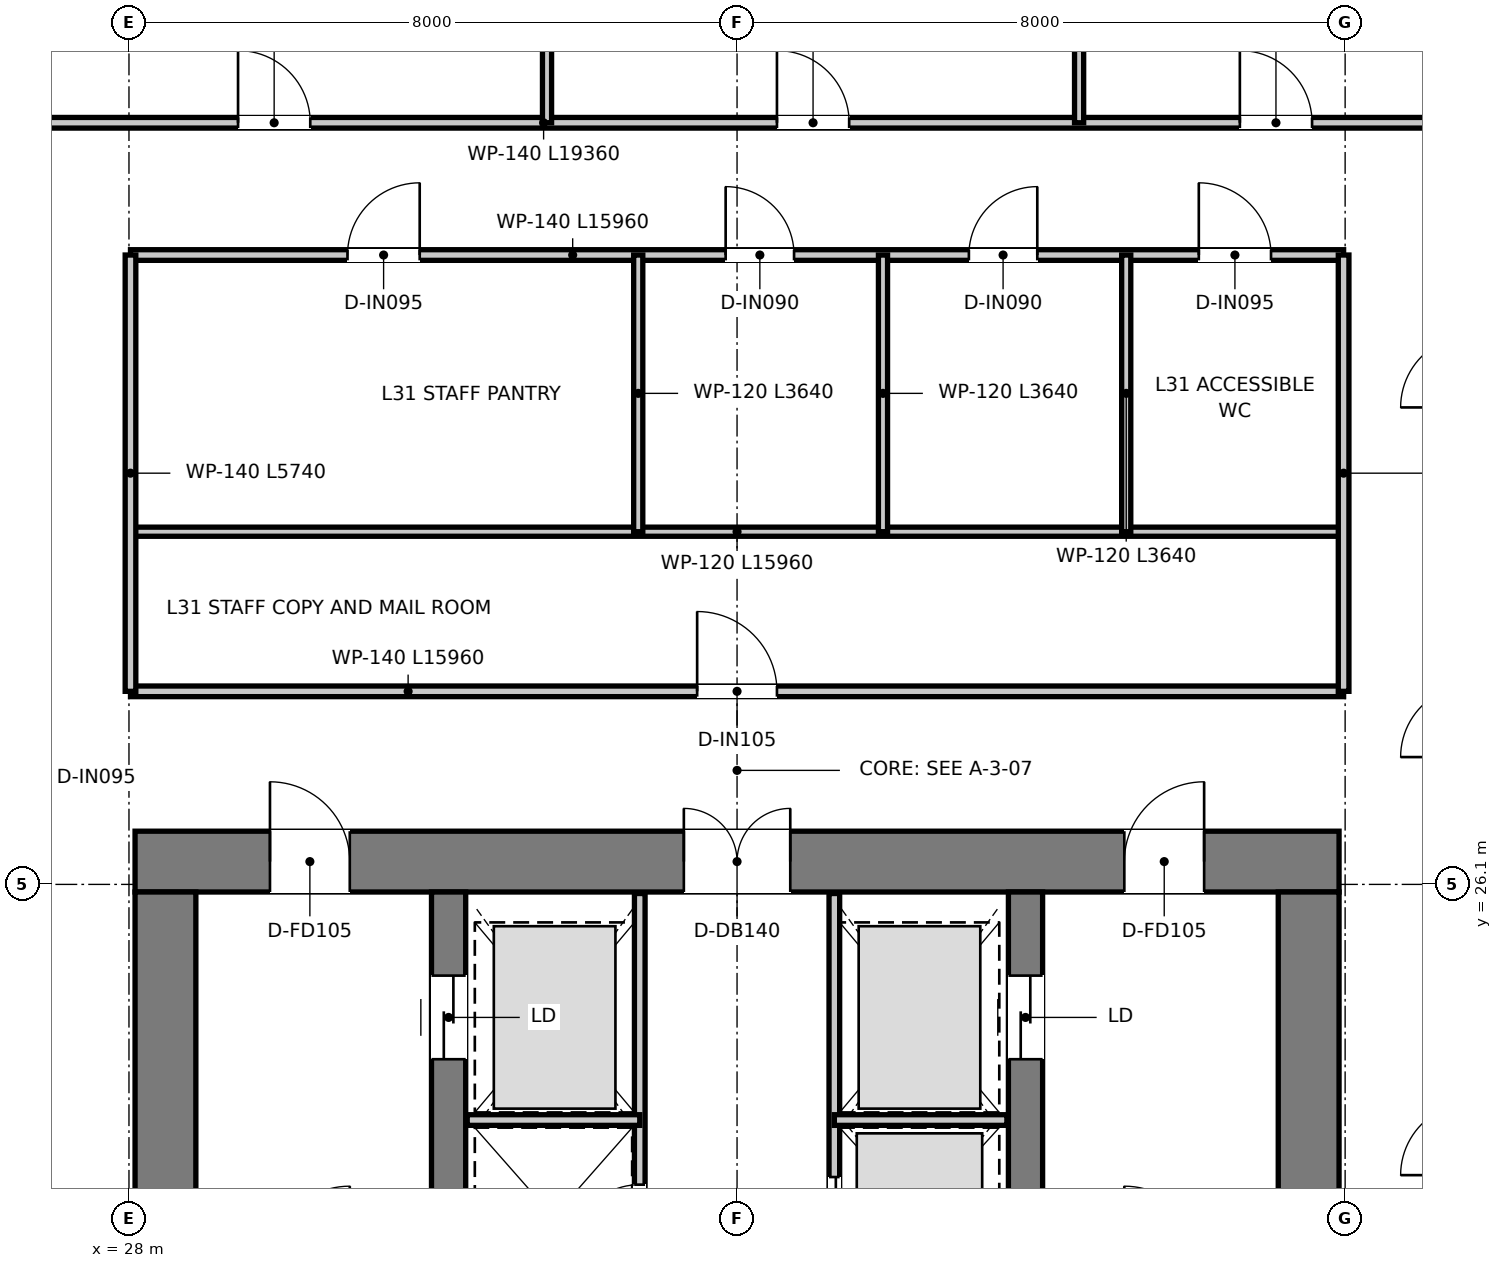
"""IFC4 building model, lengths in metres.
Left out: names, types, materials, properties, quantities, classifications, styles, units other than length and angle.
Written with IfcOpenShell. Run it as: python <this file> out.ifc"""

import sys

from ifc_helpers import new_model, si_unit, direction, frame, frame_2d, origin, place, context, subcontext, project, spatial, rectangle, extrude, element, fill, save


model = new_model("IFC4")
c1 = context("Model", 3, precision=1e-05, world=origin(), true_north=direction((0.0, 1.0)))
c2 = subcontext(c1, "Body", "Model", "MODEL_VIEW")
j1 = project(units=[si_unit("LENGTHUNIT", "METRE"), si_unit("PLANEANGLEUNIT", "RADIAN")], contexts=[c1])
p1 = place(None, origin())
s1 = spatial("IfcSite", under=j1, at=p1, CompositionType="ELEMENT")
p2 = place(p1, origin())
s2 = spatial("IfcBuilding", under=s1, at=p2, CompositionType="ELEMENT")
p3 = place(p2, frame((0.0, 0.0, 129.55)))
s3 = spatial("IfcBuildingStorey", under=s2, at=p3, CompositionType="ELEMENT", Elevation=129.55)
p4 = place(p3, frame((28.08, 26.4, 0.0), z_axis=(0.0, 0.0, 1.0), x_axis=(1.0, 0.0, 0.0)))
e1 = element("IfcWall", 1, at=p4, inside=s3, PredefinedType="SHEAR", context=c2, shape_type="SweptSolid", body=[
    extrude(rectangle(XDim=15.84, YDim=0.8, at=frame_2d((7.92, 0.0))), origin(), (0.0, 0.0, 1.0), 3.95),
])
p5 = place(p4, frame((7.22, 0.0, 0.0)))
e2 = element("IfcOpeningElement", 2, at=p5, cuts=e1, PredefinedType="OPENING", context=c2, shape_type="SweptSolid", body=[
    extrude(rectangle(XDim=1.4, YDim=2.2, at=frame_2d((0.7, 1.1))), frame((0.0, 0.41, 0.0), z_axis=(0.0, -1.0, 0.0), x_axis=(1.0, 0.0, 0.0)), (0.0, 0.0, 1.0), 0.82),
])
p6 = place(p4, frame((1.775, 0.0, 0.0)))
e3 = element("IfcOpeningElement", 3, at=p6, cuts=e1, PredefinedType="OPENING", context=c2, shape_type="SweptSolid", body=[
    extrude(rectangle(XDim=1.05, YDim=2.1, at=frame_2d((0.525, 1.05))), frame((0.0, 0.41, 0.0), z_axis=(0.0, -1.0, 0.0), x_axis=(1.0, 0.0, 0.0)), (0.0, 0.0, 1.0), 0.82),
])
p7 = place(p4, frame((13.015, 0.0, 0.0)))
e4 = element("IfcOpeningElement", 4, at=p7, cuts=e1, PredefinedType="OPENING", context=c2, shape_type="SweptSolid", body=[
    extrude(rectangle(XDim=1.05, YDim=2.1, at=frame_2d((0.525, 1.05))), frame((0.0, 0.41, 0.0), z_axis=(0.0, -1.0, 0.0), x_axis=(1.0, 0.0, 0.0)), (0.0, 0.0, 1.0), 0.82),
])
for number, where, z_axis, x_axis in (
    (5, (28.48, 11.3, 0.0), (0.0, 0.0, 1.0), (0.0, 1.0, 0.0)),
    (6, (43.52, 11.3, 0.0), (0.0, 0.0, 1.0), (0.0, 1.0, 0.0)),
):
    element("IfcWall", number, at=place(p3, frame(where, z_axis=z_axis, x_axis=x_axis)), inside=s3, PredefinedType="SHEAR", context=c2, shape_type="SweptSolid", body=[
        extrude(rectangle(XDim=14.7, YDim=0.8, at=frame_2d((7.35, 0.0))), origin(), (0.0, 0.0, 1.0), 3.95),
    ])
p8 = place(p3, frame((32.205, 13.22, 0.0), z_axis=(0.0, 0.0, 1.0), x_axis=(0.0, 1.0, 0.0)))
e7 = element("IfcWall", 7, at=p8, inside=s3, PredefinedType="SHEAR", context=c2, shape_type="SweptSolid", body=[
    extrude(rectangle(XDim=12.78, YDim=0.45, at=frame_2d((6.39, 0.0))), origin(), (0.0, 0.0, 1.0), 3.95),
])
p9 = place(p8, frame((10.58, 0.0, 0.0)))
e8 = element("IfcOpeningElement", 8, at=p9, cuts=e7, PredefinedType="OPENING", context=c2, shape_type="SweptSolid", body=[
    extrude(rectangle(XDim=1.1, YDim=2.15, at=frame_2d((0.55, 1.075))), frame((0.0, 0.235, 0.0), z_axis=(0.0, -1.0, 0.0), x_axis=(1.0, 0.0, 0.0)), (0.0, 0.0, 1.0), 0.47),
])
p10 = place(p3, frame((39.795, 13.22, 0.0), z_axis=(0.0, 0.0, 1.0), x_axis=(0.0, 1.0, 0.0)))
e9 = element("IfcWall", 9, at=p10, inside=s3, PredefinedType="SHEAR", context=c2, shape_type="SweptSolid", body=[
    extrude(rectangle(XDim=12.78, YDim=0.45, at=frame_2d((6.39, 0.0))), origin(), (0.0, 0.0, 1.0), 3.95),
])
p11 = place(p10, frame((10.58, 0.0, 0.0)))
e10 = element("IfcOpeningElement", 10, at=p11, cuts=e9, PredefinedType="OPENING", context=c2, shape_type="SweptSolid", body=[
    extrude(rectangle(XDim=1.1, YDim=2.15, at=frame_2d((0.55, 1.075))), frame((0.0, 0.235, 0.0), z_axis=(0.0, -1.0, 0.0), x_axis=(1.0, 0.0, 0.0)), (0.0, 0.0, 1.0), 0.47),
])
p12 = place(p3, frame((34.72, 20.2, 0.0), z_axis=(0.0, 0.0, 1.0), x_axis=(0.0, 1.0, 0.0)))
e11 = element("IfcWall", 11, at=p12, inside=s3, PredefinedType="PARTITIONING", context=c2, shape_type="SweptSolid", body=[
    extrude(rectangle(XDim=5.78, YDim=0.14, at=frame_2d((2.89, 0.0))), origin(), (0.0, 0.0, 1.0), 2.67),
])
p13 = place(p12, frame((1.05, 0.0, 0.0)))
e12 = element("IfcOpeningElement", 12, at=p13, cuts=e11, PredefinedType="OPENING", context=c2, shape_type="SweptSolid", body=[
    extrude(rectangle(XDim=0.9, YDim=2.1, at=frame_2d((0.45, 1.05))), frame((0.0, 0.08, 0.0), z_axis=(0.0, -1.0, 0.0), x_axis=(1.0, 0.0, 0.0)), (0.0, 0.0, 1.0), 0.16),
])
p14 = place(p3, frame((37.28, 20.2, 0.0), z_axis=(0.0, 0.0, 1.0), x_axis=(0.0, 1.0, 0.0)))
e13 = element("IfcWall", 13, at=p14, inside=s3, PredefinedType="PARTITIONING", context=c2, shape_type="SweptSolid", body=[
    extrude(rectangle(XDim=5.78, YDim=0.14, at=frame_2d((2.89, 0.0))), origin(), (0.0, 0.0, 1.0), 2.67),
])
p15 = place(p14, frame((0.95, 0.0, 0.0)))
e14 = element("IfcOpeningElement", 14, at=p15, cuts=e13, PredefinedType="OPENING", context=c2, shape_type="SweptSolid", body=[
    extrude(rectangle(XDim=1.1, YDim=2.15, at=frame_2d((0.55, 1.075))), frame((0.0, 0.08, 0.0), z_axis=(0.0, -1.0, 0.0), x_axis=(1.0, 0.0, 0.0)), (0.0, 0.0, 1.0), 0.16),
])
for number, where, z_axis, x_axis in (
    (15, (32.45, 23.0, 0.0), (0.0, 0.0, 1.0), (1.0, 0.0, 0.0)),
    (16, (37.28, 23.0, 0.0), (0.0, 0.0, 1.0), (1.0, 0.0, 0.0)),
):
    element("IfcWall", number, at=place(p3, frame(where, z_axis=z_axis, x_axis=x_axis)), inside=s3, PredefinedType="PARTITIONING", context=c2, shape_type="SweptSolid", body=[
        extrude(rectangle(XDim=2.27, YDim=0.14, at=frame_2d((1.135, 0.0))), origin(), (0.0, 0.0, 1.0), 2.67),
    ])
p16 = place(p3, frame((28.02, 28.64, 0.0), z_axis=(0.0, 0.0, 1.0), x_axis=(1.0, 0.0, 0.0)))
e17 = element("IfcWall", 17, at=p16, inside=s3, PredefinedType="PARTITIONING", context=c2, shape_type="SweptSolid", body=[
    extrude(rectangle(XDim=15.96, YDim=0.14, at=frame_2d((7.98, 0.0))), origin(), (0.0, 0.0, 1.0), 3.08),
])
p17 = place(p16, frame((7.455, 0.0, 0.0)))
e18 = element("IfcOpeningElement", 18, at=p17, cuts=e17, PredefinedType="OPENING", context=c2, shape_type="SweptSolid", body=[
    extrude(rectangle(XDim=1.05, YDim=2.15, at=frame_2d((0.525, 1.075))), frame((0.0, 0.08, 0.0), z_axis=(0.0, -1.0, 0.0), x_axis=(1.0, 0.0, 0.0)), (0.0, 0.0, 1.0), 0.16),
])
p18 = place(p3, frame((28.02, 30.74, 0.0), z_axis=(0.0, 0.0, 1.0), x_axis=(1.0, 0.0, 0.0)))
e19 = element("IfcWall", 19, at=p18, inside=s3, PredefinedType="PARTITIONING", context=c2, shape_type="SweptSolid", body=[
    extrude(rectangle(XDim=15.96, YDim=0.12, at=frame_2d((7.98, 0.0))), origin(), (0.0, 0.0, 1.0), 3.08),
])
p19 = place(p3, frame((28.02, 34.38, 0.0), z_axis=(0.0, 0.0, 1.0), x_axis=(1.0, 0.0, 0.0)))
e20 = element("IfcWall", 20, at=p19, inside=s3, PredefinedType="PARTITIONING", context=c2, shape_type="SweptSolid", body=[
    extrude(rectangle(XDim=15.96, YDim=0.14, at=frame_2d((7.98, 0.0))), origin(), (0.0, 0.0, 1.0), 3.08),
])
p20 = place(p19, frame((7.83, 0.0, 0.0)))
e21 = element("IfcOpeningElement", 21, at=p20, cuts=e20, PredefinedType="OPENING", context=c2, shape_type="SweptSolid", body=[
    extrude(rectangle(XDim=0.9, YDim=2.1, at=frame_2d((0.45, 1.05))), frame((0.0, 0.08, 0.0), z_axis=(0.0, -1.0, 0.0), x_axis=(1.0, 0.0, 0.0)), (0.0, 0.0, 1.0), 0.16),
])
p21 = place(p19, frame((11.03, 0.0, 0.0)))
e22 = element("IfcOpeningElement", 22, at=p21, cuts=e20, PredefinedType="OPENING", context=c2, shape_type="SweptSolid", body=[
    extrude(rectangle(XDim=0.9, YDim=2.1, at=frame_2d((0.45, 1.05))), frame((0.0, 0.08, 0.0), z_axis=(0.0, -1.0, 0.0), x_axis=(1.0, 0.0, 0.0)), (0.0, 0.0, 1.0), 0.16),
])
p22 = place(p19, frame((14.055, 0.0, 0.0)))
e23 = element("IfcOpeningElement", 23, at=p22, cuts=e20, PredefinedType="OPENING", context=c2, shape_type="SweptSolid", body=[
    extrude(rectangle(XDim=0.95, YDim=2.1, at=frame_2d((0.475, 1.05))), frame((0.0, 0.08, 0.0), z_axis=(0.0, -1.0, 0.0), x_axis=(1.0, 0.0, 0.0)), (0.0, 0.0, 1.0), 0.16),
])
p23 = place(p19, frame((2.855, 0.0, 0.0)))
e24 = element("IfcOpeningElement", 24, at=p23, cuts=e20, PredefinedType="OPENING", context=c2, shape_type="SweptSolid", body=[
    extrude(rectangle(XDim=0.95, YDim=2.1, at=frame_2d((0.475, 1.05))), frame((0.0, 0.08, 0.0), z_axis=(0.0, -1.0, 0.0), x_axis=(1.0, 0.0, 0.0)), (0.0, 0.0, 1.0), 0.16),
])
for number, where, z_axis, x_axis in (
    (25, (28.02, 28.64, 0.0), (0.0, 0.0, 1.0), (0.0, 1.0, 0.0)),
    (26, (43.98, 28.64, 0.0), (0.0, 0.0, 1.0), (0.0, 1.0, 0.0)),
):
    element("IfcWall", number, at=place(p3, frame(where, z_axis=z_axis, x_axis=x_axis)), inside=s3, PredefinedType="PARTITIONING", context=c2, shape_type="SweptSolid", body=[
        extrude(rectangle(XDim=5.74, YDim=0.14, at=frame_2d((2.87, 0.0))), origin(), (0.0, 0.0, 1.0), 3.27),
    ])
for number, where, z_axis, x_axis in (
    (27, (37.92, 30.74, 0.0), (0.0, 0.0, 1.0), (0.0, 1.0, 0.0)),
    (28, (41.12, 30.74, 0.0), (0.0, 0.0, 1.0), (0.0, 1.0, 0.0)),
    (29, (34.7, 30.74, 0.0), (0.0, 0.0, 1.0), (0.0, 1.0, 0.0)),
):
    element("IfcWall", number, at=place(p3, frame(where, z_axis=z_axis, x_axis=x_axis)), inside=s3, PredefinedType="PARTITIONING", context=c2, shape_type="SweptSolid", body=[
        extrude(rectangle(XDim=3.64, YDim=0.12, at=frame_2d((1.82, 0.0))), origin(), (0.0, 0.0, 1.0), 3.17),
    ])
p24 = place(p3, frame((26.32, 36.12, 0.0), z_axis=(0.0, 0.0, 1.0), x_axis=(1.0, 0.0, 0.0)))
e30 = element("IfcWall", 30, at=p24, inside=s3, PredefinedType="PARTITIONING", context=c2, shape_type="SweptSolid", body=[
    extrude(rectangle(XDim=19.36, YDim=0.14, at=frame_2d((9.68, 0.0))), origin(), (0.0, 0.0, 1.0), 3.08),
])
p25 = place(p24, frame((3.115, 0.0, 0.0)))
e31 = element("IfcOpeningElement", 31, at=p25, cuts=e30, PredefinedType="OPENING", context=c2, shape_type="SweptSolid", body=[
    extrude(rectangle(XDim=0.95, YDim=2.1, at=frame_2d((0.475, 1.05))), frame((0.0, 0.08, 0.0), z_axis=(0.0, -1.0, 0.0), x_axis=(1.0, 0.0, 0.0)), (0.0, 0.0, 1.0), 0.16),
])
p26 = place(p24, frame((10.205, 0.0, 0.0)))
e32 = element("IfcOpeningElement", 32, at=p26, cuts=e30, PredefinedType="OPENING", context=c2, shape_type="SweptSolid", body=[
    extrude(rectangle(XDim=0.95, YDim=2.1, at=frame_2d((0.475, 1.05))), frame((0.0, 0.08, 0.0), z_axis=(0.0, -1.0, 0.0), x_axis=(1.0, 0.0, 0.0)), (0.0, 0.0, 1.0), 0.16),
])
p27 = place(p24, frame((16.295, 0.0, 0.0)))
e33 = element("IfcOpeningElement", 33, at=p27, cuts=e30, PredefinedType="OPENING", context=c2, shape_type="SweptSolid", body=[
    extrude(rectangle(XDim=0.95, YDim=2.1, at=frame_2d((0.475, 1.05))), frame((0.0, 0.08, 0.0), z_axis=(0.0, -1.0, 0.0), x_axis=(1.0, 0.0, 0.0)), (0.0, 0.0, 1.0), 0.16),
])
p28 = place(p3, frame((33.5, 36.12, 0.0), z_axis=(0.0, 0.0, 1.0), x_axis=(0.0, 1.0, 0.0)))
e34 = element("IfcWall", 34, at=p28, inside=s3, PredefinedType="PARTITIONING", context=c2, shape_type="SweptSolid", body=[
    extrude(rectangle(XDim=16.562, YDim=0.12, at=frame_2d((8.281, 0.0))), origin(), (0.0, 0.0, 1.0), 2.97),
])
p29 = place(p3, frame((40.5, 36.12, 0.0), z_axis=(0.0, 0.0, 1.0), x_axis=(0.0, 1.0, 0.0)))
e35 = element("IfcWall", 35, at=p29, inside=s3, PredefinedType="PARTITIONING", context=c2, shape_type="SweptSolid", body=[
    extrude(rectangle(XDim=13.841, YDim=0.12, at=frame_2d((6.92, 0.0))), origin(), (0.0, 0.0, 1.0), 2.97),
])
p30 = place(p5, origin())
e36 = element("IfcDoor", 36, at=p30, inside=s3, OperationType="DOUBLE_DOOR_SINGLE_SWING", PredefinedType="DOOR", context=c2, shape_type="SweptSolid", body=[
    extrude(rectangle(XDim=1.4, YDim=2.2, at=frame_2d((0.7, 1.1))), frame((0.0, 0.025, 0.0), z_axis=(0.0, -1.0, 0.0), x_axis=(1.0, 0.0, 0.0)), (0.0, 0.0, 1.0), 0.05),
])
fill(e2, e36)
p31 = place(p6, origin())
e37 = element("IfcDoor", 37, at=p31, inside=s3, OperationType="SINGLE_SWING_LEFT", PredefinedType="DOOR", context=c2, shape_type="SweptSolid", body=[
    extrude(rectangle(XDim=1.05, YDim=2.1, at=frame_2d((0.525, 1.05))), frame((0.0, 0.025, 0.0), z_axis=(0.0, -1.0, 0.0), x_axis=(1.0, 0.0, 0.0)), (0.0, 0.0, 1.0), 0.05),
])
fill(e3, e37)
p32 = place(p7, origin())
e38 = element("IfcDoor", 38, at=p32, inside=s3, OperationType="SINGLE_SWING_RIGHT", PredefinedType="DOOR", context=c2, shape_type="SweptSolid", body=[
    extrude(rectangle(XDim=1.05, YDim=2.1, at=frame_2d((0.525, 1.05))), frame((0.0, 0.025, 0.0), z_axis=(0.0, -1.0, 0.0), x_axis=(1.0, 0.0, 0.0)), (0.0, 0.0, 1.0), 0.05),
])
fill(e4, e38)
p33 = place(p9, origin())
e39 = element("IfcDoor", 39, at=p33, inside=s3, OperationType="DOUBLE_DOOR_SLIDING", PredefinedType="DOOR", context=c2, shape_type="SweptSolid", body=[
    extrude(rectangle(XDim=1.1, YDim=2.15, at=frame_2d((0.55, 1.075))), frame((0.0, 0.025, 0.0), z_axis=(0.0, -1.0, 0.0), x_axis=(1.0, 0.0, 0.0)), (0.0, 0.0, 1.0), 0.05),
])
fill(e8, e39)
p34 = place(p11, origin())
e40 = element("IfcDoor", 40, at=p34, inside=s3, OperationType="DOUBLE_DOOR_SLIDING", PredefinedType="DOOR", context=c2, shape_type="SweptSolid", body=[
    extrude(rectangle(XDim=1.1, YDim=2.15, at=frame_2d((0.55, 1.075))), frame((0.0, 0.025, 0.0), z_axis=(0.0, -1.0, 0.0), x_axis=(1.0, 0.0, 0.0)), (0.0, 0.0, 1.0), 0.05),
])
fill(e10, e40)
p35 = place(p13, origin())
e41 = element("IfcDoor", 41, at=p35, inside=s3, OperationType="SINGLE_SWING_LEFT", PredefinedType="DOOR", context=c2, shape_type="SweptSolid", body=[
    extrude(rectangle(XDim=0.9, YDim=2.1, at=frame_2d((0.45, 1.05))), frame((0.0, 0.025, 0.0), z_axis=(0.0, -1.0, 0.0), x_axis=(1.0, 0.0, 0.0)), (0.0, 0.0, 1.0), 0.05),
])
fill(e12, e41)
p36 = place(p15, origin())
e42 = element("IfcDoor", 42, at=p36, inside=s3, OperationType="DOUBLE_DOOR_SLIDING", PredefinedType="DOOR", context=c2, shape_type="SweptSolid", body=[
    extrude(rectangle(XDim=1.1, YDim=2.15, at=frame_2d((0.55, 1.075))), frame((0.0, 0.025, 0.0), z_axis=(0.0, -1.0, 0.0), x_axis=(1.0, 0.0, 0.0)), (0.0, 0.0, 1.0), 0.05),
])
fill(e14, e42)
p37 = place(p17, origin())
e43 = element("IfcDoor", 43, at=p37, inside=s3, OperationType="SINGLE_SWING_LEFT", PredefinedType="DOOR", context=c2, shape_type="SweptSolid", body=[
    extrude(rectangle(XDim=1.05, YDim=2.15, at=frame_2d((0.525, 1.075))), frame((0.0, 0.025, 0.0), z_axis=(0.0, -1.0, 0.0), x_axis=(1.0, 0.0, 0.0)), (0.0, 0.0, 1.0), 0.05),
])
fill(e18, e43)
p38 = place(p20, origin())
e44 = element("IfcDoor", 44, at=p38, inside=s3, OperationType="SINGLE_SWING_LEFT", PredefinedType="DOOR", context=c2, shape_type="SweptSolid", body=[
    extrude(rectangle(XDim=0.9, YDim=2.1, at=frame_2d((0.45, 1.05))), frame((0.0, 0.025, 0.0), z_axis=(0.0, -1.0, 0.0), x_axis=(1.0, 0.0, 0.0)), (0.0, 0.0, 1.0), 0.05),
])
fill(e21, e44)
p39 = place(p21, origin())
e45 = element("IfcDoor", 45, at=p39, inside=s3, OperationType="SINGLE_SWING_RIGHT", PredefinedType="DOOR", context=c2, shape_type="SweptSolid", body=[
    extrude(rectangle(XDim=0.9, YDim=2.1, at=frame_2d((0.45, 1.05))), frame((0.0, 0.025, 0.0), z_axis=(0.0, -1.0, 0.0), x_axis=(1.0, 0.0, 0.0)), (0.0, 0.0, 1.0), 0.05),
])
fill(e22, e45)
p40 = place(p22, origin())
e46 = element("IfcDoor", 46, at=p40, inside=s3, OperationType="SINGLE_SWING_LEFT", PredefinedType="DOOR", context=c2, shape_type="SweptSolid", body=[
    extrude(rectangle(XDim=0.95, YDim=2.1, at=frame_2d((0.475, 1.05))), frame((0.0, 0.025, 0.0), z_axis=(0.0, -1.0, 0.0), x_axis=(1.0, 0.0, 0.0)), (0.0, 0.0, 1.0), 0.05),
])
fill(e23, e46)
p41 = place(p23, origin())
e47 = element("IfcDoor", 47, at=p41, inside=s3, OperationType="SINGLE_SWING_RIGHT", PredefinedType="DOOR", context=c2, shape_type="SweptSolid", body=[
    extrude(rectangle(XDim=0.95, YDim=2.1, at=frame_2d((0.475, 1.05))), frame((0.0, 0.025, 0.0), z_axis=(0.0, -1.0, 0.0), x_axis=(1.0, 0.0, 0.0)), (0.0, 0.0, 1.0), 0.05),
])
fill(e24, e47)
p42 = place(p25, origin())
e48 = element("IfcDoor", 48, at=p42, inside=s3, OperationType="SINGLE_SWING_LEFT", PredefinedType="DOOR", context=c2, shape_type="SweptSolid", body=[
    extrude(rectangle(XDim=0.95, YDim=2.1, at=frame_2d((0.475, 1.05))), frame((0.0, 0.025, 0.0), z_axis=(0.0, -1.0, 0.0), x_axis=(1.0, 0.0, 0.0)), (0.0, 0.0, 1.0), 0.05),
])
fill(e31, e48)
p43 = place(p26, origin())
e49 = element("IfcDoor", 49, at=p43, inside=s3, OperationType="SINGLE_SWING_LEFT", PredefinedType="DOOR", context=c2, shape_type="SweptSolid", body=[
    extrude(rectangle(XDim=0.95, YDim=2.1, at=frame_2d((0.475, 1.05))), frame((0.0, 0.025, 0.0), z_axis=(0.0, -1.0, 0.0), x_axis=(1.0, 0.0, 0.0)), (0.0, 0.0, 1.0), 0.05),
])
fill(e32, e49)
p44 = place(p27, origin())
e50 = element("IfcDoor", 50, at=p44, inside=s3, OperationType="SINGLE_SWING_LEFT", PredefinedType="DOOR", context=c2, shape_type="SweptSolid", body=[
    extrude(rectangle(XDim=0.95, YDim=2.1, at=frame_2d((0.475, 1.05))), frame((0.0, 0.025, 0.0), z_axis=(0.0, -1.0, 0.0), x_axis=(1.0, 0.0, 0.0)), (0.0, 0.0, 1.0), 0.05),
])
fill(e33, e50)
save(model, sys.argv[1])
